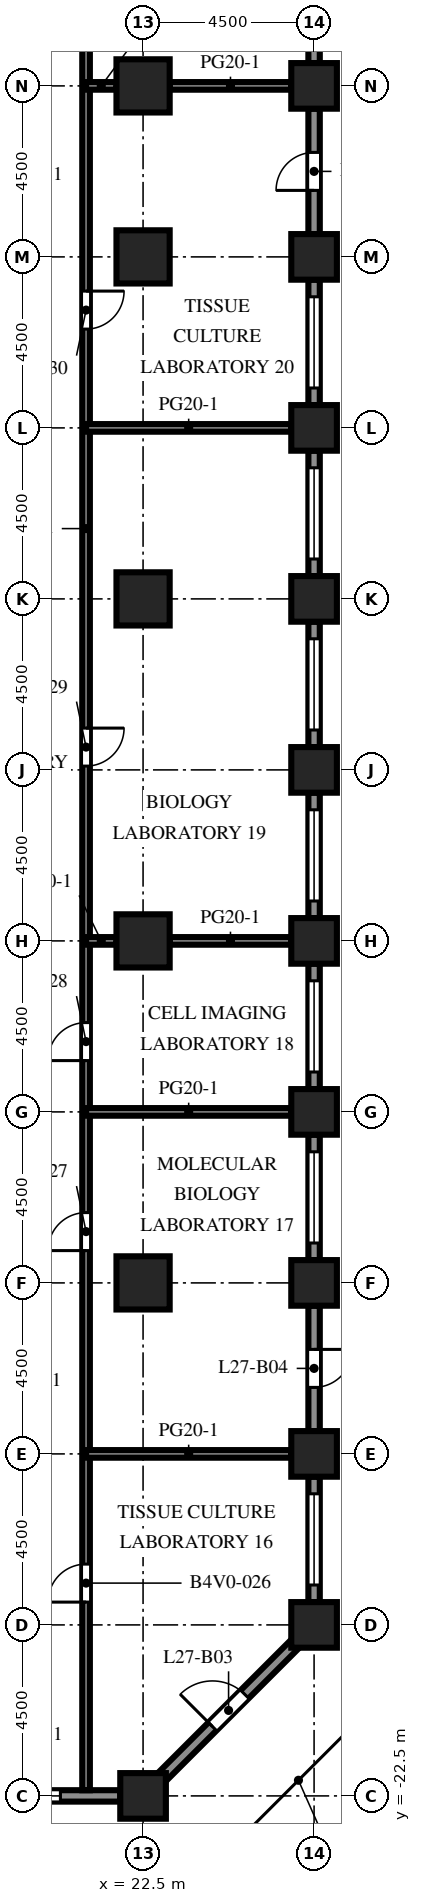
"""IFC4 building model, lengths in metres.
Left out: names, types, materials, properties, quantities, classifications, styles, units other than length and angle.
Written with IfcOpenShell. Run it as: python <this file> out.ifc"""

import sys

from ifc_helpers import new_model, si_unit, direction, frame, frame_2d, origin, origin_2d, place, context, subcontext, project, spatial, rectangle, extrude, element, fill, save


model = new_model("IFC4")
c1 = context("Model", 3, precision=1e-05, world=origin(), true_north=direction((0.0, 1.0)))
c2 = subcontext(c1, "Body", "Model", "MODEL_VIEW")
j1 = project(units=[si_unit("LENGTHUNIT", "METRE"), si_unit("PLANEANGLEUNIT", "RADIAN")], contexts=[c1])
p1 = place(None, origin())
s1 = spatial("IfcSite", under=j1, at=p1, CompositionType="ELEMENT")
p2 = place(p1, origin())
s2 = spatial("IfcBuilding", under=s1, at=p2, CompositionType="ELEMENT")
p3 = place(p2, frame((0.0, 0.0, 120.8)))
s3 = spatial("IfcBuildingStorey", under=s2, at=p3, CompositionType="ELEMENT", Elevation=120.8)
for number, where, z_axis, x_axis in (
    (1, (22.5, -22.5, 0.0), (0.0, 0.0, 1.0), (1.0, 0.0, 0.0)),
    (2, (27.0, -18.0, 0.0), (0.0, 0.0, 1.0), (1.0, 0.0, 0.0)),
    (3, (27.0, -13.5, 0.0), (0.0, 0.0, 1.0), (1.0, 0.0, 0.0)),
    (4, (27.0, -9.0, 0.0), (0.0, 0.0, 1.0), (1.0, 0.0, 0.0)),
    (5, (27.0, -4.5, 0.0), (0.0, 0.0, 1.0), (1.0, 0.0, 0.0)),
    (6, (27.0, 0.0, 0.0), (0.0, 0.0, 1.0), (1.0, 0.0, 0.0)),
    (7, (27.0, 4.5, 0.0), (0.0, 0.0, 1.0), (1.0, 0.0, 0.0)),
    (8, (27.0, 9.0, 0.0), (0.0, 0.0, 1.0), (1.0, 0.0, 0.0)),
    (9, (27.0, 13.5, 0.0), (0.0, 0.0, 1.0), (1.0, 0.0, 0.0)),
    (10, (27.0, 18.0, 0.0), (0.0, 0.0, 1.0), (1.0, 0.0, 0.0)),
    (11, (27.0, 22.5, 0.0), (0.0, 0.0, 1.0), (1.0, 0.0, 0.0)),
):
    element("IfcColumn", number, at=place(p3, frame(where, z_axis=z_axis, x_axis=x_axis)), inside=s3, PredefinedType="COLUMN", context=c2, shape_type="SweptSolid", body=[
        extrude(rectangle(XDim=1.2, YDim=1.2, at=origin_2d()), origin(), (0.0, 0.0, 1.0), 4.1),
    ])
for number, where, z_axis, x_axis in (
    (12, (22.5, -9.0, 0.0), (0.0, 0.0, 1.0), (1.0, 0.0, 0.0)),
    (13, (22.5, 0.0, 0.0), (0.0, 0.0, 1.0), (1.0, 0.0, 0.0)),
    (14, (22.5, 9.0, 0.0), (0.0, 0.0, 1.0), (1.0, 0.0, 0.0)),
    (15, (22.5, 18.0, 0.0), (0.0, 0.0, 1.0), (1.0, 0.0, 0.0)),
    (16, (22.5, 22.5, 0.0), (0.0, 0.0, 1.0), (1.0, 0.0, 0.0)),
):
    element("IfcColumn", number, at=place(p3, frame(where, z_axis=z_axis, x_axis=x_axis)), inside=s3, PredefinedType="COLUMN", context=c2, shape_type="SweptSolid", body=[
        extrude(rectangle(XDim=1.4, YDim=1.4, at=origin_2d()), origin(), (0.0, 0.0, 1.0), 4.1),
    ])
p4 = place(p3, frame((21.9, -22.5, 0.0), z_axis=(0.0, 0.0, 1.0), x_axis=(-1.0, 0.0, 0.0)))
e17 = element("IfcWall", 17, at=p4, inside=s3, PredefinedType="SOLIDWALL", context=c2, shape_type="SweptSolid", body=[
    extrude(rectangle(XDim=3.3, YDim=0.3, at=frame_2d((1.65, 0.0))), origin(), (0.0, 0.0, 1.0), 2.75),
])
p5 = place(p4, frame((1.575, 0.0, 0.8)))
e18 = element("IfcOpeningElement", 18, at=p5, cuts=e17, PredefinedType="OPENING", context=c2, shape_type="SweptSolid", body=[
    extrude(rectangle(XDim=1.2, YDim=1.7, at=frame_2d((0.6, 0.85))), frame((0.0, 0.16, 0.0), z_axis=(0.0, -1.0, 0.0), x_axis=(1.0, 0.0, 0.0)), (0.0, 0.0, 1.0), 0.32),
])
p6 = place(p3, frame((26.506, -18.494, 0.0), z_axis=(0.0, 0.0, 1.0), x_axis=(-0.707106781187, -0.707106781187, 0.0)))
e19 = element("IfcWall", 19, at=p6, inside=s3, PredefinedType="SOLIDWALL", context=c2, shape_type="SweptSolid", body=[
    extrude(rectangle(XDim=4.967, YDim=0.3, at=frame_2d((2.483, 0.0))), origin(), (0.0, 0.0, 1.0), 2.75),
])
p7 = place(p6, frame((1.884, 0.0, 0.0)))
e20 = element("IfcOpeningElement", 20, at=p7, cuts=e19, PredefinedType="OPENING", context=c2, shape_type="SweptSolid", body=[
    extrude(rectangle(XDim=1.2, YDim=2.2, at=frame_2d((0.6, 1.1))), frame((0.0, 0.16, 0.0), z_axis=(0.0, -1.0, 0.0), x_axis=(1.0, 0.0, 0.0)), (0.0, 0.0, 1.0), 0.32),
])
p8 = place(p3, frame((27.0, -14.1, 0.0), z_axis=(0.0, 0.0, 1.0), x_axis=(0.0, -1.0, 0.0)))
e21 = element("IfcWall", 21, at=p8, inside=s3, PredefinedType="SOLIDWALL", context=c2, shape_type="SweptSolid", body=[
    extrude(rectangle(XDim=3.3, YDim=0.3, at=frame_2d((1.65, 0.0))), origin(), (0.0, 0.0, 1.0), 2.75),
])
p9 = place(p8, frame((0.45, 0.0, 0.8)))
e22 = element("IfcOpeningElement", 22, at=p9, cuts=e21, PredefinedType="OPENING", context=c2, shape_type="SweptSolid", body=[
    extrude(rectangle(XDim=2.4, YDim=1.7, at=frame_2d((1.2, 0.85))), frame((0.0, 0.16, 0.0), z_axis=(0.0, -1.0, 0.0), x_axis=(1.0, 0.0, 0.0)), (0.0, 0.0, 1.0), 0.32),
])
p10 = place(p3, frame((27.0, -9.6, 0.0), z_axis=(0.0, 0.0, 1.0), x_axis=(0.0, -1.0, 0.0)))
e23 = element("IfcWall", 23, at=p10, inside=s3, PredefinedType="SOLIDWALL", context=c2, shape_type="SweptSolid", body=[
    extrude(rectangle(XDim=3.3, YDim=0.3, at=frame_2d((1.65, 0.0))), origin(), (0.0, 0.0, 1.0), 2.75),
])
p11 = place(p10, frame((1.15, 0.0, 0.0)))
e24 = element("IfcOpeningElement", 24, at=p11, cuts=e23, PredefinedType="OPENING", context=c2, shape_type="SweptSolid", body=[
    extrude(rectangle(XDim=1.0, YDim=2.2, at=frame_2d((0.5, 1.1))), frame((0.0, 0.16, 0.0), z_axis=(0.0, -1.0, 0.0), x_axis=(1.0, 0.0, 0.0)), (0.0, 0.0, 1.0), 0.32),
])
p12 = place(p3, frame((27.0, -5.1, 0.0), z_axis=(0.0, 0.0, 1.0), x_axis=(0.0, -1.0, 0.0)))
e25 = element("IfcWall", 25, at=p12, inside=s3, PredefinedType="SOLIDWALL", context=c2, shape_type="SweptSolid", body=[
    extrude(rectangle(XDim=3.3, YDim=0.3, at=frame_2d((1.65, 0.0))), origin(), (0.0, 0.0, 1.0), 2.75),
])
p13 = place(p12, frame((0.45, 0.0, 0.8)))
e26 = element("IfcOpeningElement", 26, at=p13, cuts=e25, PredefinedType="OPENING", context=c2, shape_type="SweptSolid", body=[
    extrude(rectangle(XDim=2.4, YDim=1.7, at=frame_2d((1.2, 0.85))), frame((0.0, 0.16, 0.0), z_axis=(0.0, -1.0, 0.0), x_axis=(1.0, 0.0, 0.0)), (0.0, 0.0, 1.0), 0.32),
])
p14 = place(p3, frame((27.0, -0.6, 0.0), z_axis=(0.0, 0.0, 1.0), x_axis=(0.0, -1.0, 0.0)))
e27 = element("IfcWall", 27, at=p14, inside=s3, PredefinedType="SOLIDWALL", context=c2, shape_type="SweptSolid", body=[
    extrude(rectangle(XDim=3.3, YDim=0.3, at=frame_2d((1.65, 0.0))), origin(), (0.0, 0.0, 1.0), 2.75),
])
p15 = place(p14, frame((0.45, 0.0, 0.8)))
e28 = element("IfcOpeningElement", 28, at=p15, cuts=e27, PredefinedType="OPENING", context=c2, shape_type="SweptSolid", body=[
    extrude(rectangle(XDim=2.4, YDim=1.7, at=frame_2d((1.2, 0.85))), frame((0.0, 0.16, 0.0), z_axis=(0.0, -1.0, 0.0), x_axis=(1.0, 0.0, 0.0)), (0.0, 0.0, 1.0), 0.32),
])
p16 = place(p3, frame((27.0, 3.9, 0.0), z_axis=(0.0, 0.0, 1.0), x_axis=(0.0, -1.0, 0.0)))
e29 = element("IfcWall", 29, at=p16, inside=s3, PredefinedType="SOLIDWALL", context=c2, shape_type="SweptSolid", body=[
    extrude(rectangle(XDim=3.3, YDim=0.3, at=frame_2d((1.65, 0.0))), origin(), (0.0, 0.0, 1.0), 2.75),
])
p17 = place(p16, frame((0.45, 0.0, 0.8)))
e30 = element("IfcOpeningElement", 30, at=p17, cuts=e29, PredefinedType="OPENING", context=c2, shape_type="SweptSolid", body=[
    extrude(rectangle(XDim=2.4, YDim=1.7, at=frame_2d((1.2, 0.85))), frame((0.0, 0.16, 0.0), z_axis=(0.0, -1.0, 0.0), x_axis=(1.0, 0.0, 0.0)), (0.0, 0.0, 1.0), 0.32),
])
p18 = place(p3, frame((27.0, 8.4, 0.0), z_axis=(0.0, 0.0, 1.0), x_axis=(0.0, -1.0, 0.0)))
e31 = element("IfcWall", 31, at=p18, inside=s3, PredefinedType="SOLIDWALL", context=c2, shape_type="SweptSolid", body=[
    extrude(rectangle(XDim=3.3, YDim=0.3, at=frame_2d((1.65, 0.0))), origin(), (0.0, 0.0, 1.0), 2.75),
])
p19 = place(p18, frame((0.45, 0.0, 0.8)))
e32 = element("IfcOpeningElement", 32, at=p19, cuts=e31, PredefinedType="OPENING", context=c2, shape_type="SweptSolid", body=[
    extrude(rectangle(XDim=2.4, YDim=1.7, at=frame_2d((1.2, 0.85))), frame((0.0, 0.16, 0.0), z_axis=(0.0, -1.0, 0.0), x_axis=(1.0, 0.0, 0.0)), (0.0, 0.0, 1.0), 0.32),
])
p20 = place(p3, frame((27.0, 12.9, 0.0), z_axis=(0.0, 0.0, 1.0), x_axis=(0.0, -1.0, 0.0)))
e33 = element("IfcWall", 33, at=p20, inside=s3, PredefinedType="SOLIDWALL", context=c2, shape_type="SweptSolid", body=[
    extrude(rectangle(XDim=3.3, YDim=0.3, at=frame_2d((1.65, 0.0))), origin(), (0.0, 0.0, 1.0), 2.75),
])
p21 = place(p20, frame((0.45, 0.0, 0.8)))
e34 = element("IfcOpeningElement", 34, at=p21, cuts=e33, PredefinedType="OPENING", context=c2, shape_type="SweptSolid", body=[
    extrude(rectangle(XDim=2.4, YDim=1.7, at=frame_2d((1.2, 0.85))), frame((0.0, 0.16, 0.0), z_axis=(0.0, -1.0, 0.0), x_axis=(1.0, 0.0, 0.0)), (0.0, 0.0, 1.0), 0.32),
])
p22 = place(p3, frame((27.0, 17.4, 0.0), z_axis=(0.0, 0.0, 1.0), x_axis=(0.0, -1.0, 0.0)))
e35 = element("IfcWall", 35, at=p22, inside=s3, PredefinedType="SOLIDWALL", context=c2, shape_type="SweptSolid", body=[
    extrude(rectangle(XDim=3.3, YDim=0.3, at=frame_2d((1.65, 0.0))), origin(), (0.0, 0.0, 1.0), 2.75),
])
p23 = place(p22, frame((0.45, 0.0, 0.8)))
e36 = element("IfcOpeningElement", 36, at=p23, cuts=e35, PredefinedType="OPENING", context=c2, shape_type="SweptSolid", body=[
    extrude(rectangle(XDim=2.4, YDim=1.7, at=frame_2d((1.2, 0.85))), frame((0.0, 0.16, 0.0), z_axis=(0.0, -1.0, 0.0), x_axis=(1.0, 0.0, 0.0)), (0.0, 0.0, 1.0), 0.32),
])
p24 = place(p3, frame((27.0, 21.9, 0.0), z_axis=(0.0, 0.0, 1.0), x_axis=(0.0, -1.0, 0.0)))
e37 = element("IfcWall", 37, at=p24, inside=s3, PredefinedType="SOLIDWALL", context=c2, shape_type="SweptSolid", body=[
    extrude(rectangle(XDim=3.3, YDim=0.3, at=frame_2d((1.65, 0.0))), origin(), (0.0, 0.0, 1.0), 2.75),
])
p25 = place(p24, frame((1.15, 0.0, 0.0)))
e38 = element("IfcOpeningElement", 38, at=p25, cuts=e37, PredefinedType="OPENING", context=c2, shape_type="SweptSolid", body=[
    extrude(rectangle(XDim=1.0, YDim=2.2, at=frame_2d((0.5, 1.1))), frame((0.0, 0.16, 0.0), z_axis=(0.0, -1.0, 0.0), x_axis=(1.0, 0.0, 0.0)), (0.0, 0.0, 1.0), 0.32),
])
p26 = place(p3, frame((27.0, 26.4, 0.0), z_axis=(0.0, 0.0, 1.0), x_axis=(0.0, -1.0, 0.0)))
e39 = element("IfcWall", 39, at=p26, inside=s3, PredefinedType="SOLIDWALL", context=c2, shape_type="SweptSolid", body=[
    extrude(rectangle(XDim=3.3, YDim=0.3, at=frame_2d((1.65, 0.0))), origin(), (0.0, 0.0, 1.0), 2.75),
])
p27 = place(p26, frame((0.45, 0.0, 0.8)))
e40 = element("IfcOpeningElement", 40, at=p27, cuts=e39, PredefinedType="OPENING", context=c2, shape_type="SweptSolid", body=[
    extrude(rectangle(XDim=2.4, YDim=1.7, at=frame_2d((1.2, 0.85))), frame((0.0, 0.16, 0.0), z_axis=(0.0, -1.0, 0.0), x_axis=(1.0, 0.0, 0.0)), (0.0, 0.0, 1.0), 0.32),
])
p28 = place(p3, frame((21.0, 31.35, 0.0), z_axis=(0.0, 0.0, 1.0), x_axis=(0.0, -1.0, 0.0)))
e41 = element("IfcWall", 41, at=p28, inside=s3, PredefinedType="PARTITIONING", context=c2, shape_type="SweptSolid", body=[
    extrude(rectangle(XDim=53.7, YDim=0.2, at=frame_2d((26.85, 0.0))), origin(), (0.0, 0.0, 1.0), 3.65),
])
p29 = place(p28, frame((47.75, 0.0, 0.0)))
e42 = element("IfcOpeningElement", 42, at=p29, cuts=e41, PredefinedType="OPENING", context=c2, shape_type="SweptSolid", body=[
    extrude(rectangle(XDim=1.0, YDim=2.1, at=frame_2d((0.5, 1.05))), frame((0.0, 0.11, 0.0), z_axis=(0.0, -1.0, 0.0), x_axis=(1.0, 0.0, 0.0)), (0.0, 0.0, 1.0), 0.22),
])
p30 = place(p28, frame((38.5, 0.0, 0.0)))
e43 = element("IfcOpeningElement", 43, at=p30, cuts=e41, PredefinedType="OPENING", context=c2, shape_type="SweptSolid", body=[
    extrude(rectangle(XDim=1.0, YDim=2.1, at=frame_2d((0.5, 1.05))), frame((0.0, 0.11, 0.0), z_axis=(0.0, -1.0, 0.0), x_axis=(1.0, 0.0, 0.0)), (0.0, 0.0, 1.0), 0.22),
])
p31 = place(p28, frame((33.5, 0.0, 0.0)))
e44 = element("IfcOpeningElement", 44, at=p31, cuts=e41, PredefinedType="OPENING", context=c2, shape_type="SweptSolid", body=[
    extrude(rectangle(XDim=1.0, YDim=2.1, at=frame_2d((0.5, 1.05))), frame((0.0, 0.11, 0.0), z_axis=(0.0, -1.0, 0.0), x_axis=(1.0, 0.0, 0.0)), (0.0, 0.0, 1.0), 0.22),
])
p32 = place(p28, frame((25.75, 0.0, 0.0)))
e45 = element("IfcOpeningElement", 45, at=p32, cuts=e41, PredefinedType="OPENING", context=c2, shape_type="SweptSolid", body=[
    extrude(rectangle(XDim=1.0, YDim=2.1, at=frame_2d((0.5, 1.05))), frame((0.0, 0.11, 0.0), z_axis=(0.0, -1.0, 0.0), x_axis=(1.0, 0.0, 0.0)), (0.0, 0.0, 1.0), 0.22),
])
p33 = place(p28, frame((14.25, 0.0, 0.0)))
e46 = element("IfcOpeningElement", 46, at=p33, cuts=e41, PredefinedType="OPENING", context=c2, shape_type="SweptSolid", body=[
    extrude(rectangle(XDim=1.0, YDim=2.1, at=frame_2d((0.5, 1.05))), frame((0.0, 0.11, 0.0), z_axis=(0.0, -1.0, 0.0), x_axis=(1.0, 0.0, 0.0)), (0.0, 0.0, 1.0), 0.22),
])
p34 = place(p28, frame((4.5, 0.0, 0.0)))
e47 = element("IfcOpeningElement", 47, at=p34, cuts=e41, PredefinedType="OPENING", context=c2, shape_type="SweptSolid", body=[
    extrude(rectangle(XDim=1.0, YDim=2.1, at=frame_2d((0.5, 1.05))), frame((0.0, 0.11, 0.0), z_axis=(0.0, -1.0, 0.0), x_axis=(1.0, 0.0, 0.0)), (0.0, 0.0, 1.0), 0.22),
])
for number, where, z_axis, x_axis in (
    (48, (21.0, -13.5, 0.0), (0.0, 0.0, 1.0), (1.0, 0.0, 0.0)),
    (49, (21.0, -4.5, 0.0), (0.0, 0.0, 1.0), (1.0, 0.0, 0.0)),
):
    element("IfcWall", number, at=place(p3, frame(where, z_axis=z_axis, x_axis=x_axis)), inside=s3, PredefinedType="PARTITIONING", context=c2, shape_type="SweptSolid", body=[
        extrude(rectangle(XDim=5.4, YDim=0.2, at=frame_2d((2.7, 0.0))), origin(), (0.0, 0.0, 1.0), 3.65),
    ])
p35 = place(p3, frame((21.0, 0.0, 0.0), z_axis=(0.0, 0.0, 1.0), x_axis=(1.0, 0.0, 0.0)))
e50 = element("IfcWall", 50, at=p35, inside=s3, PredefinedType="PARTITIONING", context=c2, shape_type="SweptSolid", body=[
    extrude(rectangle(XDim=0.8, YDim=0.2, at=frame_2d((0.4, 0.0))), origin(), (0.0, 0.0, 1.0), 3.65),
])
p36 = place(p3, frame((23.2, 0.0, 0.0), z_axis=(0.0, 0.0, 1.0), x_axis=(1.0, 0.0, 0.0)))
e51 = element("IfcWall", 51, at=p36, inside=s3, PredefinedType="PARTITIONING", context=c2, shape_type="SweptSolid", body=[
    extrude(rectangle(XDim=3.2, YDim=0.2, at=frame_2d((1.6, 0.0))), origin(), (0.0, 0.0, 1.0), 3.65),
])
p37 = place(p3, frame((21.0, 13.5, 0.0), z_axis=(0.0, 0.0, 1.0), x_axis=(1.0, 0.0, 0.0)))
e52 = element("IfcWall", 52, at=p37, inside=s3, PredefinedType="PARTITIONING", context=c2, shape_type="SweptSolid", body=[
    extrude(rectangle(XDim=5.4, YDim=0.2, at=frame_2d((2.7, 0.0))), origin(), (0.0, 0.0, 1.0), 3.65),
])
p38 = place(p3, frame((21.0, 22.5, 0.0), z_axis=(0.0, 0.0, 1.0), x_axis=(1.0, 0.0, 0.0)))
e53 = element("IfcWall", 53, at=p38, inside=s3, PredefinedType="PARTITIONING", context=c2, shape_type="SweptSolid", body=[
    extrude(rectangle(XDim=0.8, YDim=0.2, at=frame_2d((0.4, 0.0))), origin(), (0.0, 0.0, 1.0), 3.65),
])
p39 = place(p3, frame((23.2, 22.5, 0.0), z_axis=(0.0, 0.0, 1.0), x_axis=(1.0, 0.0, 0.0)))
e54 = element("IfcWall", 54, at=p39, inside=s3, PredefinedType="PARTITIONING", context=c2, shape_type="SweptSolid", body=[
    extrude(rectangle(XDim=3.2, YDim=0.2, at=frame_2d((1.6, 0.0))), origin(), (0.0, 0.0, 1.0), 3.65),
])
p40 = place(p5, origin())
e55 = element("IfcWindow", 55, at=p40, inside=s3, PartitioningType="SINGLE_PANEL", PredefinedType="WINDOW", context=c2, shape_type="SweptSolid", body=[
    extrude(rectangle(XDim=1.2, YDim=1.7, at=frame_2d((0.6, 0.85))), frame((0.0, 0.03, 0.0), z_axis=(0.0, -1.0, 0.0), x_axis=(1.0, 0.0, 0.0)), (0.0, 0.0, 1.0), 0.06),
])
fill(e18, e55)
p41 = place(p7, origin())
e56 = element("IfcDoor", 56, at=p41, inside=s3, OperationType="SINGLE_SWING_RIGHT", PredefinedType="DOOR", context=c2, shape_type="SweptSolid", body=[
    extrude(rectangle(XDim=1.2, YDim=2.2, at=frame_2d((0.6, 1.1))), frame((0.0, 0.025, 0.0), z_axis=(0.0, -1.0, 0.0), x_axis=(1.0, 0.0, 0.0)), (0.0, 0.0, 1.0), 0.05),
])
fill(e20, e56)
p42 = place(p9, origin())
e57 = element("IfcWindow", 57, at=p42, inside=s3, PartitioningType="SINGLE_PANEL", PredefinedType="WINDOW", context=c2, shape_type="SweptSolid", body=[
    extrude(rectangle(XDim=2.4, YDim=1.7, at=frame_2d((1.2, 0.85))), frame((0.0, 0.03, 0.0), z_axis=(0.0, -1.0, 0.0), x_axis=(1.0, 0.0, 0.0)), (0.0, 0.0, 1.0), 0.06),
])
fill(e22, e57)
p43 = place(p11, origin())
e58 = element("IfcDoor", 58, at=p43, inside=s3, OperationType="SINGLE_SWING_LEFT", PredefinedType="DOOR", context=c2, shape_type="SweptSolid", body=[
    extrude(rectangle(XDim=1.0, YDim=2.2, at=frame_2d((0.5, 1.1))), frame((0.0, 0.025, 0.0), z_axis=(0.0, -1.0, 0.0), x_axis=(1.0, 0.0, 0.0)), (0.0, 0.0, 1.0), 0.05),
])
fill(e24, e58)
p44 = place(p13, origin())
e59 = element("IfcWindow", 59, at=p44, inside=s3, PartitioningType="SINGLE_PANEL", PredefinedType="WINDOW", context=c2, shape_type="SweptSolid", body=[
    extrude(rectangle(XDim=2.4, YDim=1.7, at=frame_2d((1.2, 0.85))), frame((0.0, 0.03, 0.0), z_axis=(0.0, -1.0, 0.0), x_axis=(1.0, 0.0, 0.0)), (0.0, 0.0, 1.0), 0.06),
])
fill(e26, e59)
p45 = place(p15, origin())
e60 = element("IfcWindow", 60, at=p45, inside=s3, PartitioningType="SINGLE_PANEL", PredefinedType="WINDOW", context=c2, shape_type="SweptSolid", body=[
    extrude(rectangle(XDim=2.4, YDim=1.7, at=frame_2d((1.2, 0.85))), frame((0.0, 0.03, 0.0), z_axis=(0.0, -1.0, 0.0), x_axis=(1.0, 0.0, 0.0)), (0.0, 0.0, 1.0), 0.06),
])
fill(e28, e60)
p46 = place(p17, origin())
e61 = element("IfcWindow", 61, at=p46, inside=s3, PartitioningType="SINGLE_PANEL", PredefinedType="WINDOW", context=c2, shape_type="SweptSolid", body=[
    extrude(rectangle(XDim=2.4, YDim=1.7, at=frame_2d((1.2, 0.85))), frame((0.0, 0.03, 0.0), z_axis=(0.0, -1.0, 0.0), x_axis=(1.0, 0.0, 0.0)), (0.0, 0.0, 1.0), 0.06),
])
fill(e30, e61)
p47 = place(p19, origin())
e62 = element("IfcWindow", 62, at=p47, inside=s3, PartitioningType="SINGLE_PANEL", PredefinedType="WINDOW", context=c2, shape_type="SweptSolid", body=[
    extrude(rectangle(XDim=2.4, YDim=1.7, at=frame_2d((1.2, 0.85))), frame((0.0, 0.03, 0.0), z_axis=(0.0, -1.0, 0.0), x_axis=(1.0, 0.0, 0.0)), (0.0, 0.0, 1.0), 0.06),
])
fill(e32, e62)
p48 = place(p21, origin())
e63 = element("IfcWindow", 63, at=p48, inside=s3, PartitioningType="SINGLE_PANEL", PredefinedType="WINDOW", context=c2, shape_type="SweptSolid", body=[
    extrude(rectangle(XDim=2.4, YDim=1.7, at=frame_2d((1.2, 0.85))), frame((0.0, 0.03, 0.0), z_axis=(0.0, -1.0, 0.0), x_axis=(1.0, 0.0, 0.0)), (0.0, 0.0, 1.0), 0.06),
])
fill(e34, e63)
p49 = place(p23, origin())
e64 = element("IfcWindow", 64, at=p49, inside=s3, PartitioningType="SINGLE_PANEL", PredefinedType="WINDOW", context=c2, shape_type="SweptSolid", body=[
    extrude(rectangle(XDim=2.4, YDim=1.7, at=frame_2d((1.2, 0.85))), frame((0.0, 0.03, 0.0), z_axis=(0.0, -1.0, 0.0), x_axis=(1.0, 0.0, 0.0)), (0.0, 0.0, 1.0), 0.06),
])
fill(e36, e64)
p50 = place(p25, origin())
e65 = element("IfcDoor", 65, at=p50, inside=s3, OperationType="SINGLE_SWING_RIGHT", PredefinedType="DOOR", context=c2, shape_type="SweptSolid", body=[
    extrude(rectangle(XDim=1.0, YDim=2.2, at=frame_2d((0.5, 1.1))), frame((0.0, 0.025, 0.0), z_axis=(0.0, -1.0, 0.0), x_axis=(1.0, 0.0, 0.0)), (0.0, 0.0, 1.0), 0.05),
])
fill(e38, e65)
p51 = place(p29, origin())
e66 = element("IfcDoor", 66, at=p51, inside=s3, OperationType="SINGLE_SWING_RIGHT", PredefinedType="DOOR", context=c2, shape_type="SweptSolid", body=[
    extrude(rectangle(XDim=1.0, YDim=2.1, at=frame_2d((0.5, 1.05))), frame((0.0, 0.025, 0.0), z_axis=(0.0, -1.0, 0.0), x_axis=(1.0, 0.0, 0.0)), (0.0, 0.0, 1.0), 0.05),
])
fill(e42, e66)
p52 = place(p30, origin())
e67 = element("IfcDoor", 67, at=p52, inside=s3, OperationType="SINGLE_SWING_RIGHT", PredefinedType="DOOR", context=c2, shape_type="SweptSolid", body=[
    extrude(rectangle(XDim=1.0, YDim=2.1, at=frame_2d((0.5, 1.05))), frame((0.0, 0.025, 0.0), z_axis=(0.0, -1.0, 0.0), x_axis=(1.0, 0.0, 0.0)), (0.0, 0.0, 1.0), 0.05),
])
fill(e43, e67)
p53 = place(p31, origin())
e68 = element("IfcDoor", 68, at=p53, inside=s3, OperationType="SINGLE_SWING_RIGHT", PredefinedType="DOOR", context=c2, shape_type="SweptSolid", body=[
    extrude(rectangle(XDim=1.0, YDim=2.1, at=frame_2d((0.5, 1.05))), frame((0.0, 0.025, 0.0), z_axis=(0.0, -1.0, 0.0), x_axis=(1.0, 0.0, 0.0)), (0.0, 0.0, 1.0), 0.05),
])
fill(e44, e68)
p54 = place(p32, origin())
e69 = element("IfcDoor", 69, at=p54, inside=s3, OperationType="SINGLE_SWING_LEFT", PredefinedType="DOOR", context=c2, shape_type="SweptSolid", body=[
    extrude(rectangle(XDim=1.0, YDim=2.1, at=frame_2d((0.5, 1.05))), frame((0.0, 0.025, 0.0), z_axis=(0.0, -1.0, 0.0), x_axis=(1.0, 0.0, 0.0)), (0.0, 0.0, 1.0), 0.05),
])
fill(e45, e69)
p55 = place(p33, origin())
e70 = element("IfcDoor", 70, at=p55, inside=s3, OperationType="SINGLE_SWING_LEFT", PredefinedType="DOOR", context=c2, shape_type="SweptSolid", body=[
    extrude(rectangle(XDim=1.0, YDim=2.1, at=frame_2d((0.5, 1.05))), frame((0.0, 0.025, 0.0), z_axis=(0.0, -1.0, 0.0), x_axis=(1.0, 0.0, 0.0)), (0.0, 0.0, 1.0), 0.05),
])
fill(e46, e70)
save(model, sys.argv[1])
